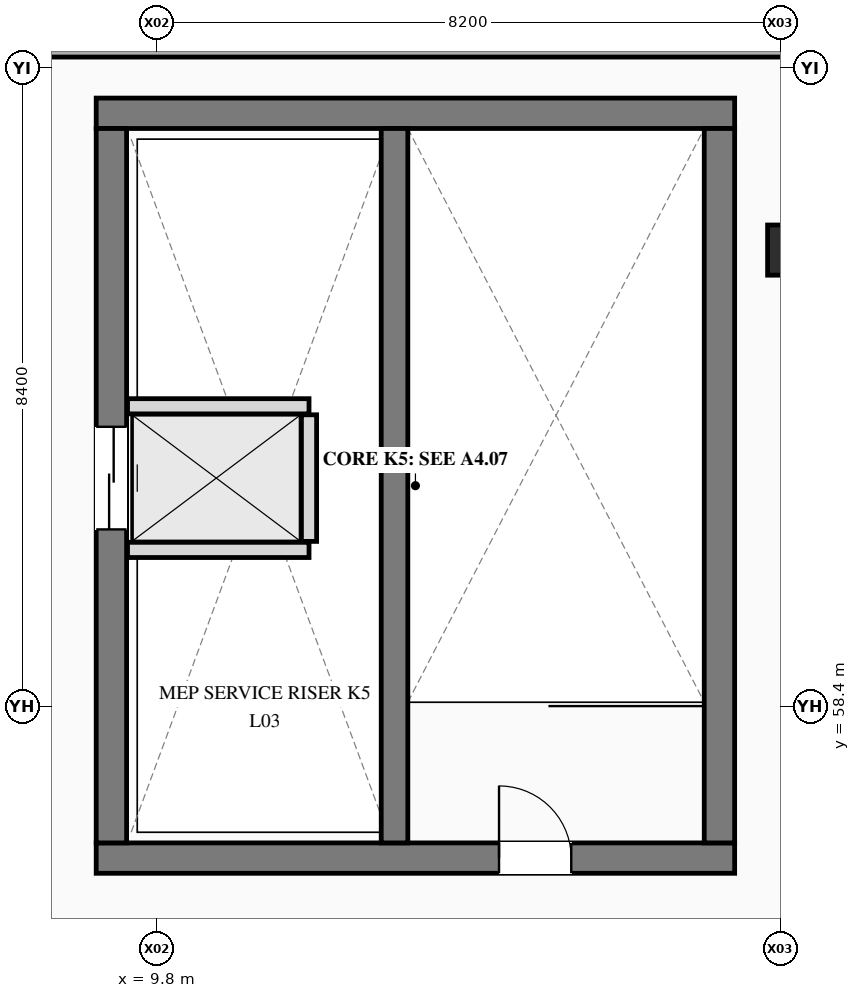
"""IFC4 building model, lengths in metres.
Left out: names, types, materials, properties, quantities, classifications, styles, units other than length and angle.
Written with IfcOpenShell. Run it as: python <this file> out.ifc"""

import sys

from ifc_helpers import new_model, si_unit, direction, frame, frame_2d, origin, origin_2d, place, context, subcontext, project, spatial, rectangle, i_section, extrude, element, fill, save


model = new_model("IFC4")
c1 = context("Model", 3, precision=1e-05, world=origin(), true_north=direction((0.0, 1.0)))
c2 = subcontext(c1, "Body", "Model", "MODEL_VIEW")
j1 = project(units=[si_unit("LENGTHUNIT", "METRE"), si_unit("PLANEANGLEUNIT", "RADIAN")], contexts=[c1])
p1 = place(None, origin())
s1 = spatial("IfcSite", under=j1, at=p1, CompositionType="ELEMENT")
p2 = place(p1, origin())
s2 = spatial("IfcBuilding", under=s1, at=p2, CompositionType="ELEMENT")
p3 = place(p2, frame((0.0, 0.0, 15.6)))
s3 = spatial("IfcBuildingStorey", under=s2, at=p3, CompositionType="ELEMENT", Elevation=15.6)
p4 = place(p3, frame((18.0, 64.4, 0.0), z_axis=(0.0, 0.0, 1.0), x_axis=(1.0, 0.0, 0.0)))
e1 = element("IfcColumn", 1, at=p4, inside=s3, PredefinedType="COLUMN", context=c2, shape_type="SweptSolid", body=[
    extrude(i_section(OverallWidth=0.333, OverallDepth=0.66, WebThickness=0.024, FlangeThickness=0.044, at=origin_2d()), origin(), (0.0, 0.0, 1.0), 3.9),
])
p5 = place(p3, frame((-0.3, 67.11, 0.0), z_axis=(0.0, 0.0, 1.0), x_axis=(1.0, 0.0, 0.0)))
e2 = element("IfcWall", 2, at=p5, inside=s3, PredefinedType="STANDARD", context=c2, shape_type="SweptSolid", body=[
    extrude(rectangle(XDim=23.1, YDim=0.34, at=frame_2d((11.55, 0.0))), origin(), (0.0, 0.0, 1.0), 3.9),
])
p6 = place(p5, frame((2.2, 0.0, 0.9)))
e3 = element("IfcOpeningElement", 3, at=p6, cuts=e2, PredefinedType="OPENING", context=c2, shape_type="SweptSolid", body=[
    extrude(rectangle(XDim=1.8, YDim=1.8, at=frame_2d((0.9, 0.9))), frame((0.0, 0.18, 0.0), z_axis=(0.0, -1.0, 0.0), x_axis=(1.0, 0.0, 0.0)), (0.0, 0.0, 1.0), 0.36),
])
p7 = place(p3, frame((9.0, 56.4, 0.0), z_axis=(0.0, 0.0, 1.0), x_axis=(1.0, 0.0, 0.0)))
e4 = element("IfcWall", 4, at=p7, inside=s3, PredefinedType="SHEAR", context=c2, shape_type="SweptSolid", body=[
    extrude(rectangle(XDim=8.4, YDim=0.4, at=frame_2d((4.2, 0.0))), origin(), (0.0, 0.0, 1.0), 3.9),
])
p8 = place(p7, frame((5.3, 0.0, 0.0)))
e5 = element("IfcOpeningElement", 5, at=p8, cuts=e4, PredefinedType="OPENING", context=c2, shape_type="SweptSolid", body=[
    extrude(rectangle(XDim=0.95, YDim=2.2, at=frame_2d((0.475, 1.1))), frame((0.0, 0.21, 0.0), z_axis=(0.0, -1.0, 0.0), x_axis=(1.0, 0.0, 0.0)), (0.0, 0.0, 1.0), 0.42),
])
p9 = place(p3, frame((17.4, 66.2, 0.0), z_axis=(0.0, 0.0, 1.0), x_axis=(-1.0, 0.0, 0.0)))
e6 = element("IfcWall", 6, at=p9, inside=s3, PredefinedType="SHEAR", context=c2, shape_type="SweptSolid", body=[
    extrude(rectangle(XDim=8.4, YDim=0.4, at=frame_2d((4.2, 0.0))), origin(), (0.0, 0.0, 1.0), 3.9),
])
p10 = place(p3, frame((9.2, 66.0, 0.0), z_axis=(0.0, 0.0, 1.0), x_axis=(0.0, -1.0, 0.0)))
e7 = element("IfcWall", 7, at=p10, inside=s3, PredefinedType="SHEAR", context=c2, shape_type="SweptSolid", body=[
    extrude(rectangle(XDim=9.4, YDim=0.4, at=frame_2d((4.7, 0.0))), origin(), (0.0, 0.0, 1.0), 3.9),
])
p11 = place(p10, frame((3.925, 0.0, 0.0)))
e8 = element("IfcOpeningElement", 8, at=p11, cuts=e7, PredefinedType="OPENING", context=c2, shape_type="SweptSolid", body=[
    extrude(rectangle(XDim=1.35, YDim=2.3, at=frame_2d((0.675, 1.15))), frame((0.0, 0.21, 0.0), z_axis=(0.0, -1.0, 0.0), x_axis=(1.0, 0.0, 0.0)), (0.0, 0.0, 1.0), 0.42),
])
p12 = place(p3, frame((17.2, 56.6, 0.0), z_axis=(0.0, 0.0, 1.0), x_axis=(0.0, 1.0, 0.0)))
e9 = element("IfcWall", 9, at=p12, inside=s3, PredefinedType="SHEAR", context=c2, shape_type="SweptSolid", body=[
    extrude(rectangle(XDim=9.4, YDim=0.4, at=frame_2d((4.7, 0.0))), origin(), (0.0, 0.0, 1.0), 3.9),
])
p13 = place(p3, frame((12.925, 56.6, 0.0), z_axis=(0.0, 0.0, 1.0), x_axis=(0.0, 1.0, 0.0)))
e10 = element("IfcWall", 10, at=p13, inside=s3, PredefinedType="SHEAR", context=c2, shape_type="SweptSolid", body=[
    extrude(rectangle(XDim=9.4, YDim=0.35, at=frame_2d((4.7, 0.0))), origin(), (0.0, 0.0, 1.0), 3.9),
])
for number, where, z_axis, x_axis in (
    (11, (9.412, 60.455, 0.0), (0.0, 0.0, 1.0), (1.0, 0.0, 0.0)),
    (12, (9.412, 62.345, 0.0), (0.0, 0.0, 1.0), (1.0, 0.0, 0.0)),
):
    element("IfcWall", number, at=place(p3, frame(where, z_axis=z_axis, x_axis=x_axis)), inside=s3, PredefinedType="PLUMBINGWALL", context=c2, shape_type="SweptSolid", body=[
        extrude(rectangle(XDim=2.388, YDim=0.2, at=frame_2d((1.194, 0.0))), origin(), (0.0, 0.0, 1.0), 3.6),
    ])
p14 = place(p3, frame((11.8, 60.567, 0.0), z_axis=(0.0, 0.0, 1.0), x_axis=(0.0, 1.0, 0.0)))
e13 = element("IfcWall", 13, at=p14, inside=s3, PredefinedType="PLUMBINGWALL", context=c2, shape_type="SweptSolid", body=[
    extrude(rectangle(XDim=1.666, YDim=0.2, at=frame_2d((0.833, 0.0))), origin(), (0.0, 0.0, 1.0), 3.6),
])
p15 = place(p8, origin())
e14 = element("IfcDoor", 14, at=p15, inside=s3, OperationType="SINGLE_SWING_LEFT", PredefinedType="DOOR", context=c2, shape_type="SweptSolid", body=[
    extrude(rectangle(XDim=0.95, YDim=2.2, at=frame_2d((0.475, 1.1))), frame((0.0, 0.025, 0.0), z_axis=(0.0, -1.0, 0.0), x_axis=(1.0, 0.0, 0.0)), (0.0, 0.0, 1.0), 0.05),
])
fill(e5, e14)
p16 = place(p11, origin())
e15 = element("IfcDoor", 15, at=p16, inside=s3, OperationType="SLIDING_TO_LEFT", PredefinedType="DOOR", context=c2, shape_type="SweptSolid", body=[
    extrude(rectangle(XDim=1.35, YDim=2.3, at=frame_2d((0.675, 1.15))), frame((0.0, 0.025, 0.0), z_axis=(0.0, -1.0, 0.0), x_axis=(1.0, 0.0, 0.0)), (0.0, 0.0, 1.0), 0.05),
])
fill(e8, e15)
save(model, sys.argv[1])
